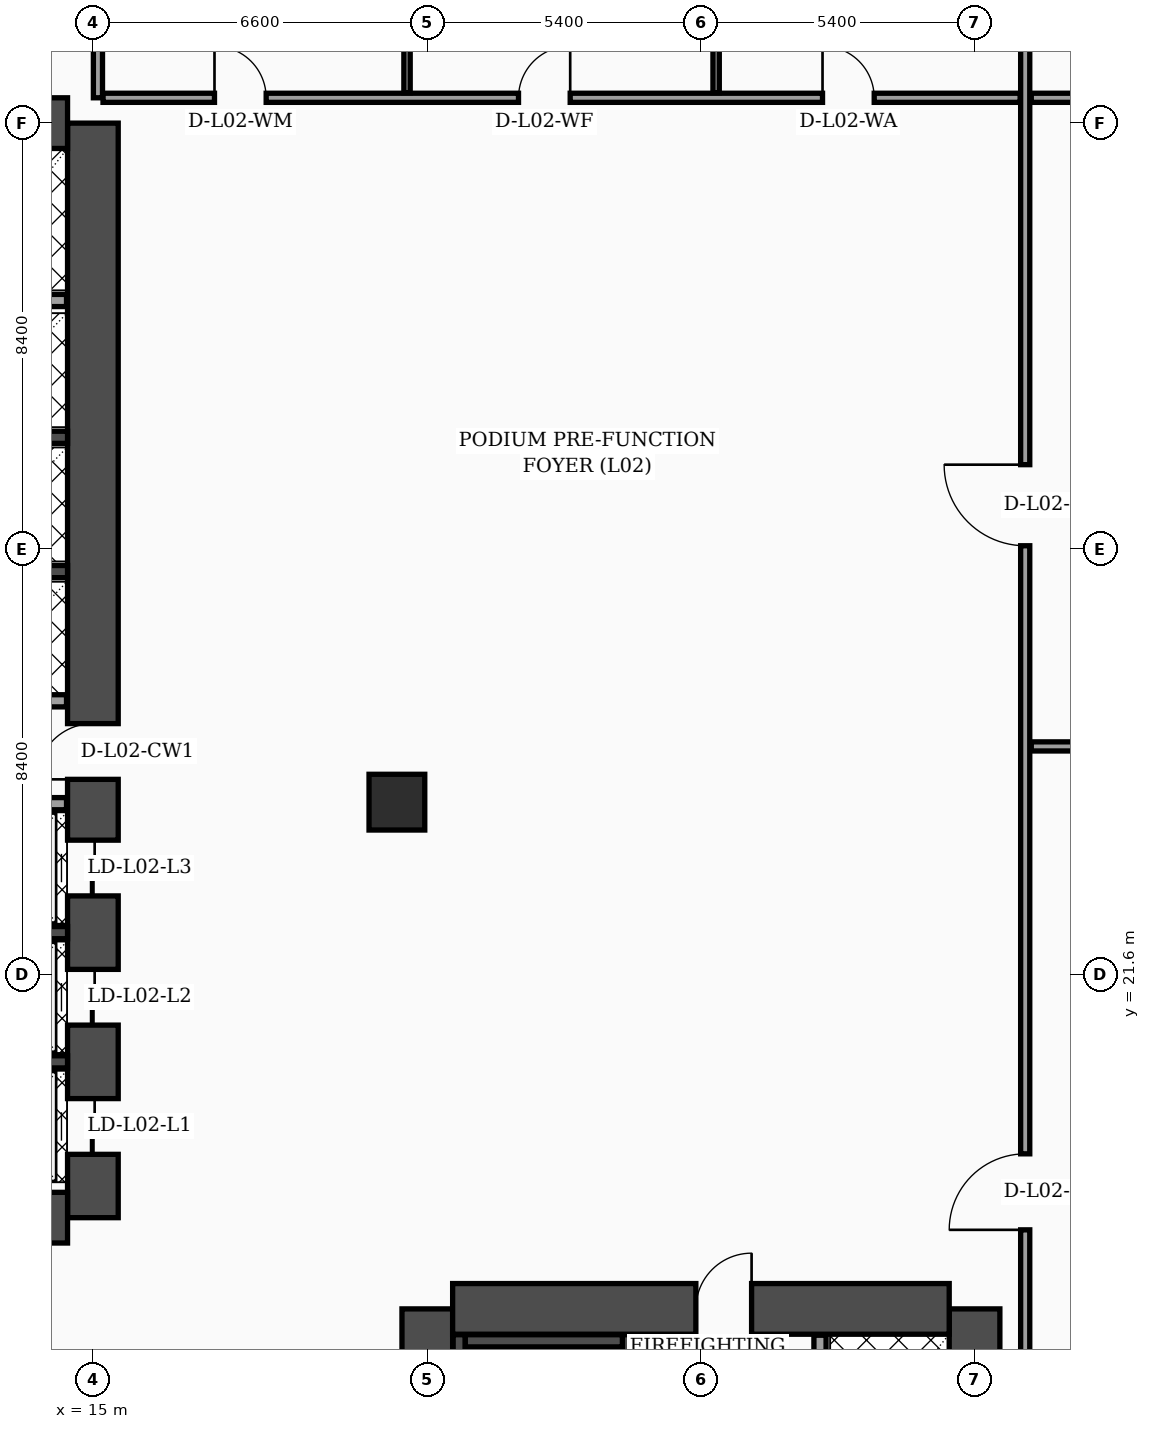
"""IFC4 building model, lengths in metres.
Left out: names, types, materials, properties, quantities, classifications, styles, units other than length and angle.
Written with IfcOpenShell. Run it as: python <this file> out.ifc"""

import sys

from ifc_helpers import new_model, si_unit, direction, frame, frame_2d, origin, origin_2d, place, context, subcontext, project, spatial, rectangle, hollow_rectangle, extrude, element, fill, save


model = new_model("IFC4")
c1 = context("Model", 3, precision=1e-05, world=origin(), true_north=direction((0.0, 1.0)))
c2 = subcontext(c1, "Body", "Model", "MODEL_VIEW")
j1 = project(units=[si_unit("LENGTHUNIT", "METRE"), si_unit("PLANEANGLEUNIT", "RADIAN")], contexts=[c1])
p1 = place(None, origin())
s1 = spatial("IfcSite", under=j1, at=p1, CompositionType="ELEMENT")
p2 = place(p1, origin())
s2 = spatial("IfcBuilding", under=s1, at=p2, CompositionType="ELEMENT")
p3 = place(p2, frame((0.0, 0.0, 12.0)))
s3 = spatial("IfcBuildingStorey", under=s2, at=p3, CompositionType="ELEMENT", Elevation=12.0)
p4 = place(p3, frame((15.0, 16.8, 0.0), z_axis=(0.0, 0.0, 1.0), x_axis=(0.0, 1.0, 0.0)))
e1 = element("IfcWall", 1, at=p4, inside=s3, PredefinedType="SHEAR", context=c2, shape_type="SweptSolid", body=[
    extrude(rectangle(XDim=21.6, YDim=1.0, at=frame_2d((10.8, 0.0))), origin(), (0.0, 0.0, 1.0), 4.68),
])
p5 = place(p4, frame((8.65, 0.0, 0.0)))
e2 = element("IfcOpeningElement", 2, at=p5, cuts=e1, PredefinedType="OPENING", context=c2, shape_type="SweptSolid", body=[
    extrude(rectangle(XDim=1.1, YDim=2.2, at=frame_2d((0.55, 1.1))), frame((0.0, 0.51, 0.0), z_axis=(0.0, -1.0, 0.0), x_axis=(1.0, 0.0, 0.0)), (0.0, 0.0, 1.0), 1.02),
])
p6 = place(p4, frame((1.25, 0.0, 0.0)))
e3 = element("IfcOpeningElement", 3, at=p6, cuts=e1, PredefinedType="OPENING", context=c2, shape_type="SweptSolid", body=[
    extrude(rectangle(XDim=1.1, YDim=2.2, at=frame_2d((0.55, 1.1))), frame((0.0, 0.51, 0.0), z_axis=(0.0, -1.0, 0.0), x_axis=(1.0, 0.0, 0.0)), (0.0, 0.0, 1.0), 1.02),
])
p7 = place(p4, frame((3.8, 0.0, 0.0)))
e4 = element("IfcOpeningElement", 4, at=p7, cuts=e1, PredefinedType="OPENING", context=c2, shape_type="SweptSolid", body=[
    extrude(rectangle(XDim=1.1, YDim=2.2, at=frame_2d((0.55, 1.1))), frame((0.0, 0.51, 0.0), z_axis=(0.0, -1.0, 0.0), x_axis=(1.0, 0.0, 0.0)), (0.0, 0.0, 1.0), 1.02),
])
p8 = place(p4, frame((6.35, 0.0, 0.0)))
e5 = element("IfcOpeningElement", 5, at=p8, cuts=e1, PredefinedType="OPENING", context=c2, shape_type="SweptSolid", body=[
    extrude(rectangle(XDim=1.1, YDim=2.2, at=frame_2d((0.55, 1.1))), frame((0.0, 0.51, 0.0), z_axis=(0.0, -1.0, 0.0), x_axis=(1.0, 0.0, 0.0)), (0.0, 0.0, 1.0), 1.02),
])
for number, where, z_axis, x_axis in (
    (6, (4.7, 38.4, 0.0), (0.0, 0.0, 1.0), (1.0, 0.0, 0.0)),
    (7, (4.7, 16.8, 0.0), (0.0, 0.0, 1.0), (1.0, 0.0, 0.0)),
):
    element("IfcWall", number, at=place(p3, frame(where, z_axis=z_axis, x_axis=x_axis)), inside=s3, PredefinedType="SHEAR", context=c2, shape_type="SweptSolid", body=[
        extrude(rectangle(XDim=9.8, YDim=1.0, at=frame_2d((4.9, 0.0))), origin(), (0.0, 0.0, 1.0), 4.68),
    ])
for number, where, z_axis, x_axis in (
    (8, (21.6, 4.6, 0.0), (0.0, 0.0, 1.0), (0.0, 1.0, 0.0)),
    (9, (32.4, 4.6, 0.0), (0.0, 0.0, 1.0), (0.0, 1.0, 0.0)),
):
    element("IfcWall", number, at=place(p3, frame(where, z_axis=z_axis, x_axis=x_axis)), inside=s3, PredefinedType="SHEAR", context=c2, shape_type="SweptSolid", body=[
        extrude(rectangle(XDim=10.4, YDim=1.0, at=frame_2d((5.2, 0.0))), origin(), (0.0, 0.0, 1.0), 4.68),
    ])
p9 = place(p3, frame((22.1, 15.0, 0.0), z_axis=(0.0, 0.0, 1.0), x_axis=(1.0, 0.0, 0.0)))
e10 = element("IfcWall", 10, at=p9, inside=s3, PredefinedType="SHEAR", context=c2, shape_type="SweptSolid", body=[
    extrude(rectangle(XDim=9.8, YDim=1.0, at=frame_2d((4.9, 0.0))), origin(), (0.0, 0.0, 1.0), 4.68),
])
p10 = place(p9, frame((4.8, 0.0, 0.0)))
e11 = element("IfcOpeningElement", 11, at=p10, cuts=e10, PredefinedType="OPENING", context=c2, shape_type="SweptSolid", body=[
    extrude(rectangle(XDim=1.1, YDim=2.2, at=frame_2d((0.55, 1.1))), frame((0.0, 0.51, 0.0), z_axis=(0.0, -1.0, 0.0), x_axis=(1.0, 0.0, 0.0)), (0.0, 0.0, 1.0), 1.02),
])
p11 = place(p3, frame((22.23, 5.1, 0.0), z_axis=(0.0, 0.0, 1.0), x_axis=(0.0, 1.0, 0.0)))
e12 = element("IfcWall", 12, at=p11, inside=s3, PredefinedType="SOLIDWALL", context=c2, shape_type="SweptSolid", body=[
    extrude(rectangle(XDim=9.39, YDim=0.24, at=frame_2d((4.695, 0.0))), origin(), (0.0, 0.0, 1.0), 4.68),
])
p12 = place(p3, frame((25.57, 5.1, 0.0), z_axis=(0.0, 0.0, 1.0), x_axis=(0.0, 1.0, 0.0)))
e13 = element("IfcWall", 13, at=p12, inside=s3, PredefinedType="SOLIDWALL", context=c2, shape_type="SweptSolid", body=[
    extrude(rectangle(XDim=9.39, YDim=0.24, at=frame_2d((4.695, 0.0))), origin(), (0.0, 0.0, 1.0), 4.68),
])
p13 = place(p12, frame((0.35, 0.0, 0.0)))
e14 = element("IfcOpeningElement", 14, at=p13, cuts=e13, PredefinedType="OPENING", context=c2, shape_type="SweptSolid", body=[
    extrude(rectangle(XDim=1.15, YDim=2.2, at=frame_2d((0.575, 1.1))), frame((0.0, 0.13, 0.0), z_axis=(0.0, -1.0, 0.0), x_axis=(1.0, 0.0, 0.0)), (0.0, 0.0, 1.0), 0.26),
])
p14 = place(p3, frame((22.35, 14.37, 0.0), z_axis=(0.0, 0.0, 1.0), x_axis=(1.0, 0.0, 0.0)))
e15 = element("IfcWall", 15, at=p14, inside=s3, PredefinedType="SOLIDWALL", context=c2, shape_type="SweptSolid", body=[
    extrude(rectangle(XDim=3.1, YDim=0.24, at=frame_2d((1.55, 0.0))), origin(), (0.0, 0.0, 1.0), 4.68),
])
for number, where, z_axis, x_axis in (
    (16, (12.18, 19.875, 0.0), (0.0, 0.0, 1.0), (1.0, 0.0, 0.0)),
    (17, (12.18, 22.425, 0.0), (0.0, 0.0, 1.0), (1.0, 0.0, 0.0)),
    (18, (12.18, 29.55, 0.0), (0.0, 0.0, 1.0), (1.0, 0.0, 0.0)),
    (19, (12.18, 32.2, 0.0), (0.0, 0.0, 1.0), (1.0, 0.0, 0.0)),
):
    element("IfcWall", number, at=place(p3, frame(where, z_axis=z_axis, x_axis=x_axis)), inside=s3, PredefinedType="SOLIDWALL", context=c2, shape_type="SweptSolid", body=[
        extrude(rectangle(XDim=2.32, YDim=0.24, at=frame_2d((1.16, 0.0))), origin(), (0.0, 0.0, 1.0), 4.68),
    ])
p15 = place(p3, frame((21.0, 25.0, 0.0), z_axis=(0.0, 0.0, 1.0), x_axis=(1.0, 0.0, 0.0)))
e20 = element("IfcColumn", 20, at=p15, inside=s3, PredefinedType="COLUMN", context=c2, shape_type="SweptSolid", body=[
    extrude(hollow_rectangle(XDim=1.1, YDim=1.1, WallThickness=0.045, at=origin_2d()), origin(), (0.0, 0.0, 1.0), 4.68),
])
p16 = place(p3, frame((12.15, 24.97, 0.0), z_axis=(0.0, 0.0, 1.0), x_axis=(1.0, 0.0, 0.0)))
e21 = element("IfcWall", 21, at=p16, inside=s3, PredefinedType="SOLIDWALL", context=c2, shape_type="SweptSolid", body=[
    extrude(rectangle(XDim=2.33, YDim=0.24, at=frame_2d((1.165, 0.0))), origin(), (0.0, 0.0, 1.0), 3.88),
])
p17 = place(p3, frame((12.25, 27.0, 0.0), z_axis=(0.0, 0.0, 1.0), x_axis=(1.0, 0.0, 0.0)))
e22 = element("IfcWall", 22, at=p17, inside=s3, PredefinedType="SOLIDWALL", context=c2, shape_type="SweptSolid", body=[
    extrude(rectangle(XDim=2.23, YDim=0.24, at=frame_2d((1.115, 0.0))), origin(), (0.0, 0.0, 1.0), 4.68),
])
p18 = place(p3, frame((9.66, 34.9, 0.0), z_axis=(0.0, 0.0, 1.0), x_axis=(1.0, 0.0, 0.0)))
e23 = element("IfcWall", 23, at=p18, inside=s3, PredefinedType="SOLIDWALL", context=c2, shape_type="SweptSolid", body=[
    extrude(rectangle(XDim=4.82, YDim=0.24, at=frame_2d((2.41, 0.0))), origin(), (0.0, 0.0, 1.0), 4.68),
])
p19 = place(p3, frame((29.35, 5.12, 0.0), z_axis=(0.0, 0.0, 1.0), x_axis=(0.0, 1.0, 0.0)))
e24 = element("IfcWall", 24, at=p19, inside=s3, PredefinedType="SOLIDWALL", context=c2, shape_type="SweptSolid", body=[
    extrude(rectangle(XDim=9.36, YDim=0.24, at=frame_2d((4.68, 0.0))), origin(), (0.0, 0.0, 1.0), 4.68),
])
p20 = place(p19, frame((0.55, 0.0, 0.0)))
e25 = element("IfcOpeningElement", 25, at=p20, cuts=e24, PredefinedType="OPENING", context=c2, shape_type="SweptSolid", body=[
    extrude(rectangle(XDim=1.3, YDim=2.35, at=frame_2d((0.65, 1.175))), frame((0.0, 0.13, 0.0), z_axis=(0.0, -1.0, 0.0), x_axis=(1.0, 0.0, 0.0)), (0.0, 0.0, 1.0), 0.26),
])
p21 = place(p3, frame((15.2, 38.9, 0.0), z_axis=(0.0, 0.0, 1.0), x_axis=(1.0, 0.0, 0.0)))
e26 = element("IfcWall", 26, at=p21, inside=s3, PredefinedType="PARTITIONING", context=c2, shape_type="SweptSolid", body=[
    extrude(rectangle(XDim=18.1, YDim=0.18, at=frame_2d((9.05, 0.0))), origin(), (0.0, 0.0, 1.0), 3.88),
])
p22 = place(p21, frame((2.2, 0.0, 0.0)))
e27 = element("IfcOpeningElement", 27, at=p22, cuts=e26, PredefinedType="OPENING", context=c2, shape_type="SweptSolid", body=[
    extrude(rectangle(XDim=1.02, YDim=2.2, at=frame_2d((0.51, 1.1))), frame((0.0, 0.1, 0.0), z_axis=(0.0, -1.0, 0.0), x_axis=(1.0, 0.0, 0.0)), (0.0, 0.0, 1.0), 0.2),
])
p23 = place(p21, frame((8.2, 0.0, 0.0)))
e28 = element("IfcOpeningElement", 28, at=p23, cuts=e26, PredefinedType="OPENING", context=c2, shape_type="SweptSolid", body=[
    extrude(rectangle(XDim=1.02, YDim=2.2, at=frame_2d((0.51, 1.1))), frame((0.0, 0.1, 0.0), z_axis=(0.0, -1.0, 0.0), x_axis=(1.0, 0.0, 0.0)), (0.0, 0.0, 1.0), 0.2),
])
p24 = place(p21, frame((14.2, 0.0, 0.0)))
e29 = element("IfcOpeningElement", 29, at=p24, cuts=e26, PredefinedType="OPENING", context=c2, shape_type="SweptSolid", body=[
    extrude(rectangle(XDim=1.02, YDim=2.2, at=frame_2d((0.51, 1.1))), frame((0.0, 0.1, 0.0), z_axis=(0.0, -1.0, 0.0), x_axis=(1.0, 0.0, 0.0)), (0.0, 0.0, 1.0), 0.2),
])
p25 = place(p3, frame((15.1, 38.9, 0.0), z_axis=(0.0, 0.0, 1.0), x_axis=(0.0, 1.0, 0.0)))
e30 = element("IfcWall", 30, at=p25, inside=s3, PredefinedType="PARTITIONING", context=c2, shape_type="SweptSolid", body=[
    extrude(rectangle(XDim=6.4, YDim=0.18, at=frame_2d((3.2, 0.0))), origin(), (0.0, 0.0, 1.0), 3.88),
])
p26 = place(p3, frame((21.2, 39.0, 0.0), z_axis=(0.0, 0.0, 1.0), x_axis=(0.0, 1.0, 0.0)))
e31 = element("IfcWall", 31, at=p26, inside=s3, PredefinedType="PARTITIONING", context=c2, shape_type="SweptSolid", body=[
    extrude(rectangle(XDim=6.2, YDim=0.125, at=frame_2d((3.1, 0.0))), origin(), (0.0, 0.0, 1.0), 3.88),
])
p27 = place(p3, frame((27.3, 39.0, 0.0), z_axis=(0.0, 0.0, 1.0), x_axis=(0.0, 1.0, 0.0)))
e32 = element("IfcWall", 32, at=p27, inside=s3, PredefinedType="PARTITIONING", context=c2, shape_type="SweptSolid", body=[
    extrude(rectangle(XDim=6.2, YDim=0.125, at=frame_2d((3.1, 0.0))), origin(), (0.0, 0.0, 1.0), 4.68),
])
p28 = place(p3, frame((33.4, 0.06, 0.0), z_axis=(0.0, 0.0, 1.0), x_axis=(0.0, 1.0, 0.0)))
e33 = element("IfcWall", 33, at=p28, inside=s3, PredefinedType="PARTITIONING", context=c2, shape_type="SweptSolid", body=[
    extrude(rectangle(XDim=57.88, YDim=0.18, at=frame_2d((28.94, 0.0))), origin(), (0.0, 0.0, 1.0), 3.88),
])
p29 = place(p28, frame((16.5, 0.0, 0.0)))
e34 = element("IfcOpeningElement", 34, at=p29, cuts=e33, PredefinedType="OPENING", context=c2, shape_type="SweptSolid", body=[
    extrude(rectangle(XDim=1.5, YDim=2.22, at=frame_2d((0.75, 1.11))), frame((0.0, 0.1, 0.0), z_axis=(0.0, -1.0, 0.0), x_axis=(1.0, 0.0, 0.0)), (0.0, 0.0, 1.0), 0.2),
])
p30 = place(p28, frame((30.0, 0.0, 0.0)))
e35 = element("IfcOpeningElement", 35, at=p30, cuts=e33, PredefinedType="OPENING", context=c2, shape_type="SweptSolid", body=[
    extrude(rectangle(XDim=1.6, YDim=2.35, at=frame_2d((0.8, 1.175))), frame((0.0, 0.1, 0.0), z_axis=(0.0, -1.0, 0.0), x_axis=(1.0, 0.0, 0.0)), (0.0, 0.0, 1.0), 0.2),
])
p31 = place(p3, frame((33.52, 26.1, 0.0), z_axis=(0.0, 0.0, 1.0), x_axis=(1.0, 0.0, 0.0)))
e36 = element("IfcWall", 36, at=p31, inside=s3, PredefinedType="PARTITIONING", context=c2, shape_type="SweptSolid", body=[
    extrude(rectangle(XDim=50.42, YDim=0.18, at=frame_2d((25.21, 0.0))), origin(), (0.0, 0.0, 1.0), 3.18),
])
p32 = place(p3, frame((33.52, 38.9, 0.0), z_axis=(0.0, 0.0, 1.0), x_axis=(1.0, 0.0, 0.0)))
e37 = element("IfcWall", 37, at=p32, inside=s3, PredefinedType="PARTITIONING", context=c2, shape_type="SweptSolid", body=[
    extrude(rectangle(XDim=50.42, YDim=0.18, at=frame_2d((25.21, 0.0))), origin(), (0.0, 0.0, 1.0), 3.88),
])
p33 = place(p22, origin())
e38 = element("IfcDoor", 38, at=p33, inside=s3, OperationType="SINGLE_SWING_LEFT", PredefinedType="DOOR", context=c2, shape_type="SweptSolid", body=[
    extrude(rectangle(XDim=1.02, YDim=2.2, at=frame_2d((0.51, 1.1))), frame((0.0, 0.025, 0.0), z_axis=(0.0, -1.0, 0.0), x_axis=(1.0, 0.0, 0.0)), (0.0, 0.0, 1.0), 0.05),
])
fill(e27, e38)
p34 = place(p23, origin())
e39 = element("IfcDoor", 39, at=p34, inside=s3, OperationType="SINGLE_SWING_RIGHT", PredefinedType="DOOR", context=c2, shape_type="SweptSolid", body=[
    extrude(rectangle(XDim=1.02, YDim=2.2, at=frame_2d((0.51, 1.1))), frame((0.0, 0.025, 0.0), z_axis=(0.0, -1.0, 0.0), x_axis=(1.0, 0.0, 0.0)), (0.0, 0.0, 1.0), 0.05),
])
fill(e28, e39)
p35 = place(p24, origin())
e40 = element("IfcDoor", 40, at=p35, inside=s3, OperationType="SINGLE_SWING_LEFT", PredefinedType="DOOR", context=c2, shape_type="SweptSolid", body=[
    extrude(rectangle(XDim=1.02, YDim=2.2, at=frame_2d((0.51, 1.1))), frame((0.0, 0.025, 0.0), z_axis=(0.0, -1.0, 0.0), x_axis=(1.0, 0.0, 0.0)), (0.0, 0.0, 1.0), 0.05),
])
fill(e29, e40)
p36 = place(p29, origin())
e41 = element("IfcDoor", 41, at=p36, inside=s3, OperationType="SINGLE_SWING_LEFT", PredefinedType="DOOR", context=c2, shape_type="SweptSolid", body=[
    extrude(rectangle(XDim=1.5, YDim=2.22, at=frame_2d((0.75, 1.11))), frame((0.0, 0.025, 0.0), z_axis=(0.0, -1.0, 0.0), x_axis=(1.0, 0.0, 0.0)), (0.0, 0.0, 1.0), 0.05),
])
fill(e34, e41)
p37 = place(p30, origin())
e42 = element("IfcDoor", 42, at=p37, inside=s3, OperationType="SINGLE_SWING_RIGHT", PredefinedType="DOOR", context=c2, shape_type="SweptSolid", body=[
    extrude(rectangle(XDim=1.6, YDim=2.35, at=frame_2d((0.8, 1.175))), frame((0.0, 0.025, 0.0), z_axis=(0.0, -1.0, 0.0), x_axis=(1.0, 0.0, 0.0)), (0.0, 0.0, 1.0), 0.05),
])
fill(e35, e42)
p38 = place(p5, origin())
e43 = element("IfcDoor", 43, at=p38, inside=s3, OperationType="SINGLE_SWING_LEFT", PredefinedType="DOOR", context=c2, shape_type="SweptSolid", body=[
    extrude(rectangle(XDim=1.1, YDim=2.2, at=frame_2d((0.55, 1.1))), frame((0.0, 0.025, 0.0), z_axis=(0.0, -1.0, 0.0), x_axis=(1.0, 0.0, 0.0)), (0.0, 0.0, 1.0), 0.05),
])
fill(e2, e43)
p39 = place(p6, origin())
e44 = element("IfcDoor", 44, at=p39, inside=s3, OperationType="DOUBLE_DOOR_SLIDING", PredefinedType="DOOR", context=c2, shape_type="SweptSolid", body=[
    extrude(rectangle(XDim=1.1, YDim=2.2, at=frame_2d((0.55, 1.1))), frame((0.0, 0.025, 0.0), z_axis=(0.0, -1.0, 0.0), x_axis=(1.0, 0.0, 0.0)), (0.0, 0.0, 1.0), 0.05),
])
fill(e3, e44)
p40 = place(p7, origin())
e45 = element("IfcDoor", 45, at=p40, inside=s3, OperationType="DOUBLE_DOOR_SLIDING", PredefinedType="DOOR", context=c2, shape_type="SweptSolid", body=[
    extrude(rectangle(XDim=1.1, YDim=2.2, at=frame_2d((0.55, 1.1))), frame((0.0, 0.025, 0.0), z_axis=(0.0, -1.0, 0.0), x_axis=(1.0, 0.0, 0.0)), (0.0, 0.0, 1.0), 0.05),
])
fill(e4, e45)
p41 = place(p8, origin())
e46 = element("IfcDoor", 46, at=p41, inside=s3, OperationType="DOUBLE_DOOR_SLIDING", PredefinedType="DOOR", context=c2, shape_type="SweptSolid", body=[
    extrude(rectangle(XDim=1.1, YDim=2.2, at=frame_2d((0.55, 1.1))), frame((0.0, 0.025, 0.0), z_axis=(0.0, -1.0, 0.0), x_axis=(1.0, 0.0, 0.0)), (0.0, 0.0, 1.0), 0.05),
])
fill(e5, e46)
p42 = place(p10, origin())
e47 = element("IfcDoor", 47, at=p42, inside=s3, OperationType="SINGLE_SWING_RIGHT", PredefinedType="DOOR", context=c2, shape_type="SweptSolid", body=[
    extrude(rectangle(XDim=1.1, YDim=2.2, at=frame_2d((0.55, 1.1))), frame((0.0, 0.025, 0.0), z_axis=(0.0, -1.0, 0.0), x_axis=(1.0, 0.0, 0.0)), (0.0, 0.0, 1.0), 0.05),
])
fill(e11, e47)
save(model, sys.argv[1])
